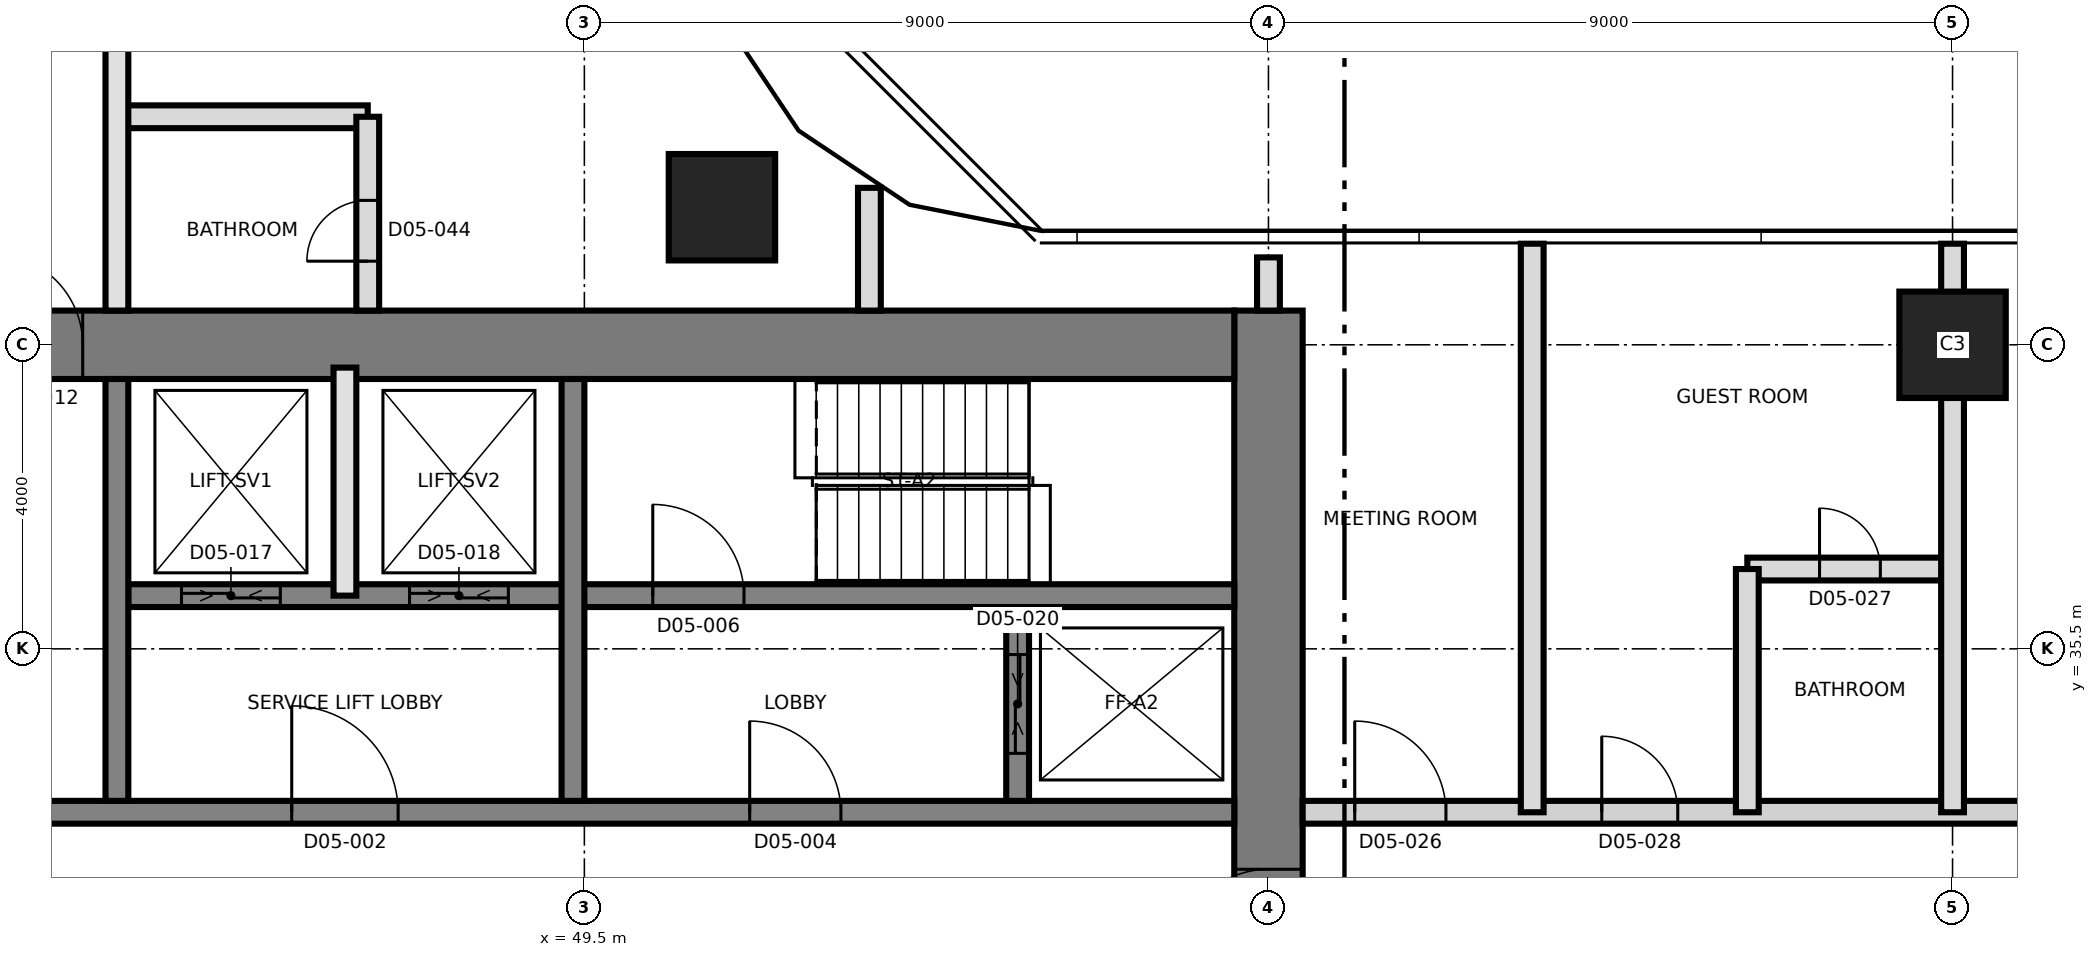
"""IFC4 building model, lengths in metres.
Left out: names, types, materials, properties, quantities, classifications, styles, units other than length and angle.
Written with IfcOpenShell. Run it as: python <this file> out.ifc"""

import sys

from ifc_helpers import new_model, si_unit, direction, frame, frame_2d, origin, origin_2d, place, context, subcontext, project, spatial, rectangle, extrude, element, fill, save


model = new_model("IFC4")
c1 = context("Model", 3, precision=1e-05, world=origin(), true_north=direction((0.0, 1.0)))
c2 = subcontext(c1, "Body", "Model", "MODEL_VIEW")
j1 = project(units=[si_unit("LENGTHUNIT", "METRE"), si_unit("PLANEANGLEUNIT", "RADIAN")], contexts=[c1])
p1 = place(None, origin())
s1 = spatial("IfcSite", under=j1, at=p1, CompositionType="ELEMENT")
p2 = place(p1, origin())
s2 = spatial("IfcBuilding", under=s1, at=p2, CompositionType="ELEMENT")
p3 = place(p2, frame((0.0, 0.0, 77.9)))
s3 = spatial("IfcBuildingStorey", under=s2, at=p3, CompositionType="ELEMENT", Elevation=77.9)
p4 = place(p3, frame((58.5, 21.05, 0.0), z_axis=(0.0, 0.0, 1.0), x_axis=(0.0, 1.0, 0.0)))
e1 = element("IfcWall", 1, at=p4, inside=s3, PredefinedType="SHEAR", context=c2, shape_type="SweptSolid", body=[
    extrude(rectangle(XDim=18.9, YDim=0.9, at=frame_2d((9.45, 0.0))), origin(), (0.0, 0.0, 1.0), 3.7),
])
p5 = place(p4, frame((10.35, 0.0, 0.0)))
e2 = element("IfcOpeningElement", 2, at=p5, cuts=e1, PredefinedType="OPENING", context=c2, shape_type="SweptSolid", body=[
    extrude(rectangle(XDim=1.2, YDim=2.1, at=frame_2d((0.6, 1.05))), frame((0.0, 0.46, 0.0), z_axis=(0.0, -1.0, 0.0), x_axis=(1.0, 0.0, 0.0)), (0.0, 0.0, 1.0), 0.92),
])
p6 = place(p3, frame((31.05, 39.5, 0.0), z_axis=(0.0, 0.0, 1.0), x_axis=(1.0, 0.0, 0.0)))
e3 = element("IfcWall", 3, at=p6, inside=s3, PredefinedType="SHEAR", context=c2, shape_type="SweptSolid", body=[
    extrude(rectangle(XDim=27.0, YDim=0.9, at=frame_2d((13.5, 0.0))), origin(), (0.0, 0.0, 1.0), 3.7),
])
p7 = place(p6, frame((10.65, 0.0, 0.0)))
e4 = element("IfcOpeningElement", 4, at=p7, cuts=e3, PredefinedType="OPENING", context=c2, shape_type="SweptSolid", body=[
    extrude(rectangle(XDim=1.2, YDim=2.1, at=frame_2d((0.6, 1.05))), frame((0.0, 0.46, 0.0), z_axis=(0.0, -1.0, 0.0), x_axis=(1.0, 0.0, 0.0)), (0.0, 0.0, 1.0), 0.92),
])
p8 = place(p3, frame((31.95, 33.35, 0.0), z_axis=(0.0, 0.0, 1.0), x_axis=(1.0, 0.0, 0.0)))
e5 = element("IfcWall", 5, at=p8, inside=s3, PredefinedType="SHEAR", context=c2, shape_type="SweptSolid", body=[
    extrude(rectangle(XDim=26.1, YDim=0.3, at=frame_2d((13.05, 0.0))), origin(), (0.0, 0.0, 1.0), 3.7),
])
p9 = place(p8, frame((13.7, 0.0, 0.0)))
e6 = element("IfcOpeningElement", 6, at=p9, cuts=e5, PredefinedType="OPENING", context=c2, shape_type="SweptSolid", body=[
    extrude(rectangle(XDim=1.4, YDim=2.1, at=frame_2d((0.7, 1.05))), frame((0.0, 0.16, 0.0), z_axis=(0.0, -1.0, 0.0), x_axis=(1.0, 0.0, 0.0)), (0.0, 0.0, 1.0), 0.32),
])
p10 = place(p8, frame((5.175, 0.0, 0.0)))
e7 = element("IfcOpeningElement", 7, at=p10, cuts=e5, PredefinedType="OPENING", context=c2, shape_type="SweptSolid", body=[
    extrude(rectangle(XDim=1.2, YDim=2.1, at=frame_2d((0.6, 1.05))), frame((0.0, 0.16, 0.0), z_axis=(0.0, -1.0, 0.0), x_axis=(1.0, 0.0, 0.0)), (0.0, 0.0, 1.0), 0.32),
])
p11 = place(p8, frame((19.725, 0.0, 0.0)))
e8 = element("IfcOpeningElement", 8, at=p11, cuts=e5, PredefinedType="OPENING", context=c2, shape_type="SweptSolid", body=[
    extrude(rectangle(XDim=1.2, YDim=2.1, at=frame_2d((0.6, 1.05))), frame((0.0, 0.16, 0.0), z_axis=(0.0, -1.0, 0.0), x_axis=(1.0, 0.0, 0.0)), (0.0, 0.0, 1.0), 0.32),
])
p12 = place(p3, frame((43.5, 36.2, 0.0), z_axis=(0.0, 0.0, 1.0), x_axis=(1.0, 0.0, 0.0)))
e9 = element("IfcWall", 9, at=p12, inside=s3, PredefinedType="SHEAR", context=c2, shape_type="SweptSolid", body=[
    extrude(rectangle(XDim=14.55, YDim=0.3, at=frame_2d((7.275, 0.0))), origin(), (0.0, 0.0, 1.0), 3.7),
])
p13 = place(p12, frame((6.9, 0.0, 0.0)))
e10 = element("IfcOpeningElement", 10, at=p13, cuts=e9, PredefinedType="OPENING", context=c2, shape_type="SweptSolid", body=[
    extrude(rectangle(XDim=1.2, YDim=2.1, at=frame_2d((0.6, 1.05))), frame((0.0, 0.16, 0.0), z_axis=(0.0, -1.0, 0.0), x_axis=(1.0, 0.0, 0.0)), (0.0, 0.0, 1.0), 0.32),
])
p14 = place(p12, frame((0.7, 0.0, 0.0)))
e11 = element("IfcOpeningElement", 11, at=p14, cuts=e9, PredefinedType="OPENING", context=c2, shape_type="SweptSolid", body=[
    extrude(rectangle(XDim=1.3, YDim=2.4, at=frame_2d((0.65, 1.2))), frame((0.0, 0.16, 0.0), z_axis=(0.0, -1.0, 0.0), x_axis=(1.0, 0.0, 0.0)), (0.0, 0.0, 1.0), 0.32),
])
p15 = place(p12, frame((3.7, 0.0, 0.0)))
e12 = element("IfcOpeningElement", 12, at=p15, cuts=e9, PredefinedType="OPENING", context=c2, shape_type="SweptSolid", body=[
    extrude(rectangle(XDim=1.3, YDim=2.4, at=frame_2d((0.65, 1.2))), frame((0.0, 0.16, 0.0), z_axis=(0.0, -1.0, 0.0), x_axis=(1.0, 0.0, 0.0)), (0.0, 0.0, 1.0), 0.32),
])
for number, where, z_axis, x_axis in (
    (13, (43.35, 33.5, 0.0), (0.0, 0.0, 1.0), (0.0, 1.0, 0.0)),
    (14, (49.35, 33.5, 0.0), (0.0, 0.0, 1.0), (0.0, 1.0, 0.0)),
):
    element("IfcWall", number, at=place(p3, frame(where, z_axis=z_axis, x_axis=x_axis)), inside=s3, PredefinedType="SHEAR", context=c2, shape_type="SweptSolid", body=[
        extrude(rectangle(XDim=5.55, YDim=0.3, at=frame_2d((2.775, 0.0))), origin(), (0.0, 0.0, 1.0), 3.7),
    ])
p16 = place(p3, frame((55.2, 33.5, 0.0), z_axis=(0.0, 0.0, 1.0), x_axis=(0.0, 1.0, 0.0)))
e15 = element("IfcWall", 15, at=p16, inside=s3, PredefinedType="SHEAR", context=c2, shape_type="SweptSolid", body=[
    extrude(rectangle(XDim=2.55, YDim=0.3, at=frame_2d((1.275, 0.0))), origin(), (0.0, 0.0, 1.0), 3.7),
])
p17 = place(p16, frame((0.625, 0.0, 0.0)))
e16 = element("IfcOpeningElement", 16, at=p17, cuts=e15, PredefinedType="OPENING", context=c2, shape_type="SweptSolid", body=[
    extrude(rectangle(XDim=1.3, YDim=2.4, at=frame_2d((0.65, 1.2))), frame((0.0, 0.16, 0.0), z_axis=(0.0, -1.0, 0.0), x_axis=(1.0, 0.0, 0.0)), (0.0, 0.0, 1.0), 0.32),
])
for number, where, z_axis, x_axis in (
    (17, (67.5, 39.5, 0.0), (0.0, 0.0, 1.0), (1.0, 0.0, 0.0)),
    (18, (51.31, 41.31, 0.0), (0.0, 0.0, 1.0), (1.0, 0.0, 0.0)),
):
    element("IfcColumn", number, at=place(p3, frame(where, z_axis=z_axis, x_axis=x_axis)), inside=s3, PredefinedType="COLUMN", context=c2, shape_type="SweptSolid", body=[
        extrude(rectangle(XDim=1.4, YDim=1.4, at=origin_2d()), origin(), (0.0, 0.0, 1.0), 3.7),
    ])
p18 = place(p3, frame((46.35, 36.2, 0.0), z_axis=(0.0, 0.0, 1.0), x_axis=(0.0, 1.0, 0.0)))
e19 = element("IfcWall", 19, at=p18, inside=s3, PredefinedType="SOLIDWALL", context=c2, shape_type="SweptSolid", body=[
    extrude(rectangle(XDim=3.0, YDim=0.3, at=frame_2d((1.5, 0.0))), origin(), (0.0, 0.0, 1.0), 3.4),
])
p19 = place(p3, frame((58.95, 33.35, 0.0), z_axis=(0.0, 0.0, 1.0), x_axis=(1.0, 0.0, 0.0)))
e20 = element("IfcWall", 20, at=p19, inside=s3, PredefinedType="PARTITIONING", context=c2, shape_type="SweptSolid", body=[
    extrude(rectangle(XDim=26.38, YDim=0.3, at=frame_2d((13.19, 0.0))), origin(), (0.0, 0.0, 1.0), 3.4),
])
p20 = place(p19, frame((0.685, 0.0, 0.0)))
e21 = element("IfcOpeningElement", 21, at=p20, cuts=e20, PredefinedType="OPENING", context=c2, shape_type="SweptSolid", body=[
    extrude(rectangle(XDim=1.2, YDim=2.1, at=frame_2d((0.6, 1.05))), frame((0.0, 0.16, 0.0), z_axis=(0.0, -1.0, 0.0), x_axis=(1.0, 0.0, 0.0)), (0.0, 0.0, 1.0), 0.32),
])
p21 = place(p19, frame((3.935, 0.0, 0.0)))
e22 = element("IfcOpeningElement", 22, at=p21, cuts=e20, PredefinedType="OPENING", context=c2, shape_type="SweptSolid", body=[
    extrude(rectangle(XDim=1.0, YDim=2.1, at=frame_2d((0.5, 1.05))), frame((0.0, 0.16, 0.0), z_axis=(0.0, -1.0, 0.0), x_axis=(1.0, 0.0, 0.0)), (0.0, 0.0, 1.0), 0.32),
])
p22 = place(p19, frame((9.58, 0.0, 0.0)))
e23 = element("IfcOpeningElement", 23, at=p22, cuts=e20, PredefinedType="OPENING", context=c2, shape_type="SweptSolid", body=[
    extrude(rectangle(XDim=1.0, YDim=2.1, at=frame_2d((0.5, 1.05))), frame((0.0, 0.16, 0.0), z_axis=(0.0, -1.0, 0.0), x_axis=(1.0, 0.0, 0.0)), (0.0, 0.0, 1.0), 0.32),
])
p23 = place(p19, frame((15.43, 0.0, 0.0)))
e24 = element("IfcOpeningElement", 24, at=p23, cuts=e20, PredefinedType="OPENING", context=c2, shape_type="SweptSolid", body=[
    extrude(rectangle(XDim=1.0, YDim=2.1, at=frame_2d((0.5, 1.05))), frame((0.0, 0.16, 0.0), z_axis=(0.0, -1.0, 0.0), x_axis=(1.0, 0.0, 0.0)), (0.0, 0.0, 1.0), 0.32),
])
p24 = place(p19, frame((21.55, 0.0, 0.0)))
e25 = element("IfcOpeningElement", 25, at=p24, cuts=e20, PredefinedType="OPENING", context=c2, shape_type="SweptSolid", body=[
    extrude(rectangle(XDim=1.0, YDim=2.4, at=frame_2d((0.5, 1.2))), frame((0.0, 0.16, 0.0), z_axis=(0.0, -1.0, 0.0), x_axis=(1.0, 0.0, 0.0)), (0.0, 0.0, 1.0), 0.32),
])
p25 = place(p3, frame((64.8, 36.55, 0.0), z_axis=(0.0, 0.0, 1.0), x_axis=(1.0, 0.0, 0.0)))
e26 = element("IfcWall", 26, at=p25, inside=s3, PredefinedType="PARTITIONING", context=c2, shape_type="SweptSolid", body=[
    extrude(rectangle(XDim=2.7, YDim=0.3, at=frame_2d((1.35, 0.0))), origin(), (0.0, 0.0, 1.0), 3.4),
])
p26 = place(p25, frame((0.95, 0.0, 0.0)))
e27 = element("IfcOpeningElement", 27, at=p26, cuts=e26, PredefinedType="OPENING", context=c2, shape_type="SweptSolid", body=[
    extrude(rectangle(XDim=0.8, YDim=2.1, at=frame_2d((0.4, 1.05))), frame((0.0, 0.16, 0.0), z_axis=(0.0, -1.0, 0.0), x_axis=(1.0, 0.0, 0.0)), (0.0, 0.0, 1.0), 0.32),
])
p27 = place(p3, frame((43.35, 42.5, 0.0), z_axis=(0.0, 0.0, 1.0), x_axis=(1.0, 0.0, 0.0)))
e28 = element("IfcWall", 28, at=p27, inside=s3, PredefinedType="PARTITIONING", context=c2, shape_type="SweptSolid", body=[
    extrude(rectangle(XDim=3.3, YDim=0.3, at=frame_2d((1.65, 0.0))), origin(), (0.0, 0.0, 1.0), 3.4),
])
p28 = place(p3, frame((43.35, 39.95, 0.0), z_axis=(0.0, 0.0, 1.0), x_axis=(0.0, 1.0, 0.0)))
e29 = element("IfcWall", 29, at=p28, inside=s3, PredefinedType="SOLIDWALL", context=c2, shape_type="SweptSolid", body=[
    extrude(rectangle(XDim=25.85, YDim=0.3, at=frame_2d((12.925, 0.0))), origin(), (0.0, 0.0, 1.0), 3.4),
])
p29 = place(p28, frame((3.55, 0.0, 0.0)))
e30 = element("IfcOpeningElement", 30, at=p29, cuts=e29, PredefinedType="OPENING", context=c2, shape_type="SweptSolid", body=[
    extrude(rectangle(XDim=1.0, YDim=2.4, at=frame_2d((0.5, 1.2))), frame((0.0, 0.16, 0.0), z_axis=(0.0, -1.0, 0.0), x_axis=(1.0, 0.0, 0.0)), (0.0, 0.0, 1.0), 0.32),
])
p30 = place(p28, frame((9.7, 0.0, 0.0)))
e31 = element("IfcOpeningElement", 31, at=p30, cuts=e29, PredefinedType="OPENING", context=c2, shape_type="SweptSolid", body=[
    extrude(rectangle(XDim=1.0, YDim=2.1, at=frame_2d((0.5, 1.05))), frame((0.0, 0.16, 0.0), z_axis=(0.0, -1.0, 0.0), x_axis=(1.0, 0.0, 0.0)), (0.0, 0.0, 1.0), 0.32),
])
p31 = place(p28, frame((15.55, 0.0, 0.0)))
e32 = element("IfcOpeningElement", 32, at=p31, cuts=e29, PredefinedType="OPENING", context=c2, shape_type="SweptSolid", body=[
    extrude(rectangle(XDim=1.0, YDim=2.1, at=frame_2d((0.5, 1.05))), frame((0.0, 0.16, 0.0), z_axis=(0.0, -1.0, 0.0), x_axis=(1.0, 0.0, 0.0)), (0.0, 0.0, 1.0), 0.32),
])
p32 = place(p28, frame((21.1, 0.0, 0.0)))
e33 = element("IfcOpeningElement", 33, at=p32, cuts=e29, PredefinedType="OPENING", context=c2, shape_type="SweptSolid", body=[
    extrude(rectangle(XDim=1.0, YDim=2.4, at=frame_2d((0.5, 1.2))), frame((0.0, 0.16, 0.0), z_axis=(0.0, -1.0, 0.0), x_axis=(1.0, 0.0, 0.0)), (0.0, 0.0, 1.0), 0.32),
])
p33 = place(p3, frame((46.65, 39.95, 0.0), z_axis=(0.0, 0.0, 1.0), x_axis=(0.0, 1.0, 0.0)))
e34 = element("IfcWall", 34, at=p33, inside=s3, PredefinedType="PARTITIONING", context=c2, shape_type="SweptSolid", body=[
    extrude(rectangle(XDim=2.55, YDim=0.3, at=frame_2d((1.275, 0.0))), origin(), (0.0, 0.0, 1.0), 3.4),
])
p34 = place(p33, frame((0.65, 0.0, 0.0)))
e35 = element("IfcOpeningElement", 35, at=p34, cuts=e34, PredefinedType="OPENING", context=c2, shape_type="SweptSolid", body=[
    extrude(rectangle(XDim=0.8, YDim=2.1, at=frame_2d((0.4, 1.05))), frame((0.0, 0.16, 0.0), z_axis=(0.0, -1.0, 0.0), x_axis=(1.0, 0.0, 0.0)), (0.0, 0.0, 1.0), 0.32),
])
p35 = place(p3, frame((53.25, 39.95, 0.0), z_axis=(0.0, 0.0, 1.0), x_axis=(0.0, 1.0, 0.0)))
e36 = element("IfcWall", 36, at=p35, inside=s3, PredefinedType="PARTITIONING", context=c2, shape_type="SweptSolid", body=[
    extrude(rectangle(XDim=1.615, YDim=0.3, at=frame_2d((0.808, 0.0))), origin(), (0.0, 0.0, 1.0), 3.4),
])
p36 = place(p3, frame((58.5, 39.95, 0.0), z_axis=(0.0, 0.0, 1.0), x_axis=(0.0, 1.0, 0.0)))
e37 = element("IfcWall", 37, at=p36, inside=s3, PredefinedType="PARTITIONING", context=c2, shape_type="SweptSolid", body=[
    extrude(rectangle(XDim=0.7, YDim=0.3, at=frame_2d((0.35, 0.0))), origin(), (0.0, 0.0, 1.0), 3.4),
])
p37 = place(p3, frame((61.97, 33.35, 0.0), z_axis=(0.0, 0.0, 1.0), x_axis=(0.0, 1.0, 0.0)))
e38 = element("IfcWall", 38, at=p37, inside=s3, PredefinedType="PARTITIONING", context=c2, shape_type="SweptSolid", body=[
    extrude(rectangle(XDim=7.48, YDim=0.3, at=frame_2d((3.74, 0.0))), origin(), (0.0, 0.0, 1.0), 3.4),
])
p38 = place(p3, frame((64.8, 33.35, 0.0), z_axis=(0.0, 0.0, 1.0), x_axis=(0.0, 1.0, 0.0)))
e39 = element("IfcWall", 39, at=p38, inside=s3, PredefinedType="PARTITIONING", context=c2, shape_type="SweptSolid", body=[
    extrude(rectangle(XDim=3.2, YDim=0.3, at=frame_2d((1.6, 0.0))), origin(), (0.0, 0.0, 1.0), 3.4),
])
p39 = place(p3, frame((67.5, 33.35, 0.0), z_axis=(0.0, 0.0, 1.0), x_axis=(0.0, 1.0, 0.0)))
e40 = element("IfcWall", 40, at=p39, inside=s3, PredefinedType="PARTITIONING", context=c2, shape_type="SweptSolid", body=[
    extrude(rectangle(XDim=7.48, YDim=0.3, at=frame_2d((3.74, 0.0))), origin(), (0.0, 0.0, 1.0), 3.4),
])
p40 = place(p9, origin())
e41 = element("IfcDoor", 41, at=p40, inside=s3, OperationType="SINGLE_SWING_RIGHT", PredefinedType="DOOR", context=c2, shape_type="SweptSolid", body=[
    extrude(rectangle(XDim=1.4, YDim=2.1, at=frame_2d((0.7, 1.05))), frame((0.0, 0.025, 0.0), z_axis=(0.0, -1.0, 0.0), x_axis=(1.0, 0.0, 0.0)), (0.0, 0.0, 1.0), 0.05),
])
fill(e6, e41)
p41 = place(p11, origin())
e42 = element("IfcDoor", 42, at=p41, inside=s3, OperationType="SINGLE_SWING_RIGHT", PredefinedType="DOOR", context=c2, shape_type="SweptSolid", body=[
    extrude(rectangle(XDim=1.2, YDim=2.1, at=frame_2d((0.6, 1.05))), frame((0.0, 0.025, 0.0), z_axis=(0.0, -1.0, 0.0), x_axis=(1.0, 0.0, 0.0)), (0.0, 0.0, 1.0), 0.05),
])
fill(e8, e42)
p42 = place(p13, origin())
e43 = element("IfcDoor", 43, at=p42, inside=s3, OperationType="SINGLE_SWING_LEFT", PredefinedType="DOOR", context=c2, shape_type="SweptSolid", body=[
    extrude(rectangle(XDim=1.2, YDim=2.1, at=frame_2d((0.6, 1.05))), frame((0.0, 0.025, 0.0), z_axis=(0.0, -1.0, 0.0), x_axis=(1.0, 0.0, 0.0)), (0.0, 0.0, 1.0), 0.05),
])
fill(e10, e43)
p43 = place(p5, origin())
e44 = element("IfcDoor", 44, at=p43, inside=s3, OperationType="SINGLE_SWING_LEFT", PredefinedType="DOOR", context=c2, shape_type="SweptSolid", body=[
    extrude(rectangle(XDim=1.2, YDim=2.1, at=frame_2d((0.6, 1.05))), frame((0.0, 0.025, 0.0), z_axis=(0.0, -1.0, 0.0), x_axis=(1.0, 0.0, 0.0)), (0.0, 0.0, 1.0), 0.05),
])
fill(e2, e44)
p44 = place(p7, origin())
e45 = element("IfcDoor", 45, at=p44, inside=s3, OperationType="SINGLE_SWING_RIGHT", PredefinedType="DOOR", context=c2, shape_type="SweptSolid", body=[
    extrude(rectangle(XDim=1.2, YDim=2.1, at=frame_2d((0.6, 1.05))), frame((0.0, 0.025, 0.0), z_axis=(0.0, -1.0, 0.0), x_axis=(1.0, 0.0, 0.0)), (0.0, 0.0, 1.0), 0.05),
])
fill(e4, e45)
p45 = place(p14, origin())
e46 = element("IfcDoor", 46, at=p45, inside=s3, OperationType="SLIDING_TO_LEFT", PredefinedType="DOOR", context=c2, shape_type="SweptSolid", body=[
    extrude(rectangle(XDim=1.3, YDim=2.4, at=frame_2d((0.65, 1.2))), frame((0.0, 0.025, 0.0), z_axis=(0.0, -1.0, 0.0), x_axis=(1.0, 0.0, 0.0)), (0.0, 0.0, 1.0), 0.05),
])
fill(e11, e46)
p46 = place(p15, origin())
e47 = element("IfcDoor", 47, at=p46, inside=s3, OperationType="SLIDING_TO_LEFT", PredefinedType="DOOR", context=c2, shape_type="SweptSolid", body=[
    extrude(rectangle(XDim=1.3, YDim=2.4, at=frame_2d((0.65, 1.2))), frame((0.0, 0.025, 0.0), z_axis=(0.0, -1.0, 0.0), x_axis=(1.0, 0.0, 0.0)), (0.0, 0.0, 1.0), 0.05),
])
fill(e12, e47)
p47 = place(p17, origin())
e48 = element("IfcDoor", 48, at=p47, inside=s3, OperationType="SLIDING_TO_LEFT", PredefinedType="DOOR", context=c2, shape_type="SweptSolid", body=[
    extrude(rectangle(XDim=1.3, YDim=2.4, at=frame_2d((0.65, 1.2))), frame((0.0, 0.025, 0.0), z_axis=(0.0, -1.0, 0.0), x_axis=(1.0, 0.0, 0.0)), (0.0, 0.0, 1.0), 0.05),
])
fill(e16, e48)
p48 = place(p20, origin())
e49 = element("IfcDoor", 49, at=p48, inside=s3, OperationType="SINGLE_SWING_LEFT", PredefinedType="DOOR", context=c2, shape_type="SweptSolid", body=[
    extrude(rectangle(XDim=1.2, YDim=2.1, at=frame_2d((0.6, 1.05))), frame((0.0, 0.025, 0.0), z_axis=(0.0, -1.0, 0.0), x_axis=(1.0, 0.0, 0.0)), (0.0, 0.0, 1.0), 0.05),
])
fill(e21, e49)
p49 = place(p26, origin())
e50 = element("IfcDoor", 50, at=p49, inside=s3, OperationType="SINGLE_SWING_RIGHT", PredefinedType="DOOR", context=c2, shape_type="SweptSolid", body=[
    extrude(rectangle(XDim=0.8, YDim=2.1, at=frame_2d((0.4, 1.05))), frame((0.0, 0.025, 0.0), z_axis=(0.0, -1.0, 0.0), x_axis=(1.0, 0.0, 0.0)), (0.0, 0.0, 1.0), 0.05),
])
fill(e27, e50)
p50 = place(p21, origin())
e51 = element("IfcDoor", 51, at=p50, inside=s3, OperationType="SINGLE_SWING_LEFT", PredefinedType="DOOR", context=c2, shape_type="SweptSolid", body=[
    extrude(rectangle(XDim=1.0, YDim=2.1, at=frame_2d((0.5, 1.05))), frame((0.0, 0.025, 0.0), z_axis=(0.0, -1.0, 0.0), x_axis=(1.0, 0.0, 0.0)), (0.0, 0.0, 1.0), 0.05),
])
fill(e22, e51)
p51 = place(p34, origin())
e52 = element("IfcDoor", 52, at=p51, inside=s3, OperationType="SINGLE_SWING_LEFT", PredefinedType="DOOR", context=c2, shape_type="SweptSolid", body=[
    extrude(rectangle(XDim=0.8, YDim=2.1, at=frame_2d((0.4, 1.05))), frame((0.0, 0.025, 0.0), z_axis=(0.0, -1.0, 0.0), x_axis=(1.0, 0.0, 0.0)), (0.0, 0.0, 1.0), 0.05),
])
fill(e35, e52)
save(model, sys.argv[1])
